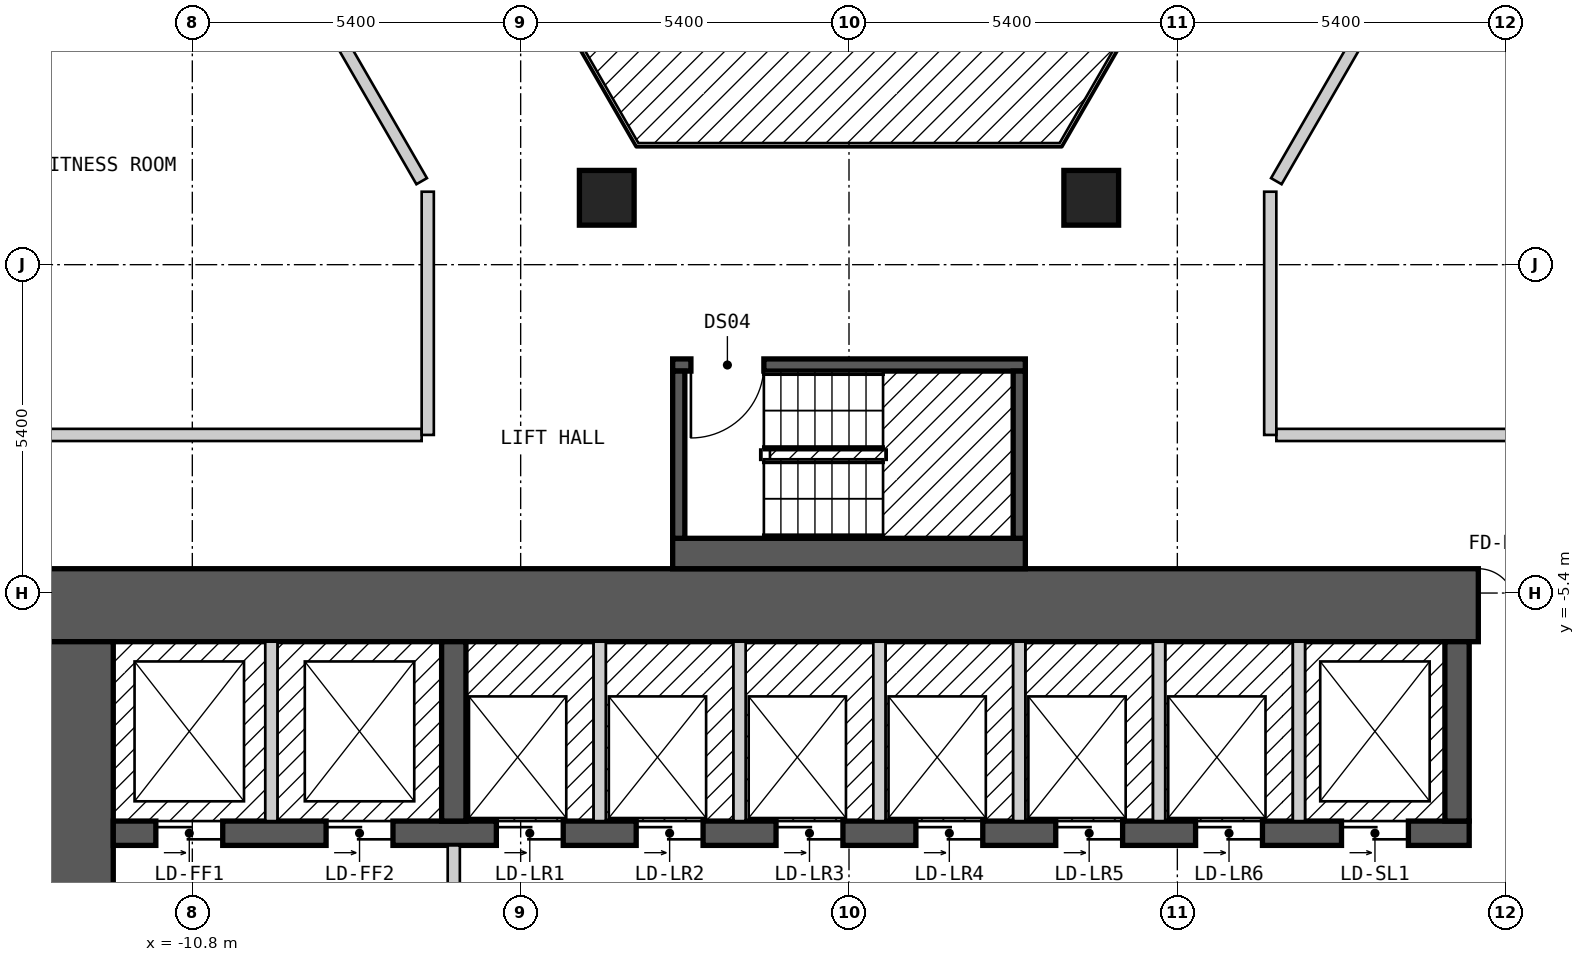
"""IFC4 building model, lengths in metres.
Left out: names, types, materials, properties, quantities, classifications, styles, units other than length and angle.
Written with IfcOpenShell. Run it as: python <this file> out.ifc"""

import sys

from ifc_helpers import new_model, si_unit, direction, frame, frame_2d, origin, origin_2d, place, context, subcontext, project, spatial, rectangle, extrude, element, fill, save


model = new_model("IFC4")
c1 = context("Model", 3, precision=1e-05, world=origin(), true_north=direction((0.0, 1.0)))
c2 = subcontext(c1, "Body", "Model", "MODEL_VIEW")
j1 = project(units=[si_unit("LENGTHUNIT", "METRE"), si_unit("PLANEANGLEUNIT", "RADIAN")], contexts=[c1])
p1 = place(None, origin())
s1 = spatial("IfcSite", under=j1, at=p1, CompositionType="ELEMENT")
p2 = place(p1, origin())
s2 = spatial("IfcBuilding", under=s1, at=p2, CompositionType="ELEMENT")
p3 = place(p2, frame((0.0, 0.0, 47.4)))
s3 = spatial("IfcBuildingStorey", under=s2, at=p3, CompositionType="ELEMENT", Elevation=47.4)
for number, where, z_axis, x_axis in (
    (1, (3.984, 1.1, 0.0), (0.0, 0.0, 1.0), (1.0, 0.0, 0.0)),
    (2, (-3.984, 1.1, 0.0), (0.0, 0.0, 1.0), (1.0, 0.0, 0.0)),
):
    element("IfcColumn", number, at=place(p3, frame(where, z_axis=z_axis, x_axis=x_axis)), inside=s3, PredefinedType="COLUMN", context=c2, shape_type="SweptSolid", body=[
        extrude(rectangle(XDim=0.9, YDim=0.9, at=origin_2d()), origin(), (0.0, 0.0, 1.0), 3.0),
    ])
p4 = place(p3, frame((-13.3, -5.6, 0.0), z_axis=(0.0, 0.0, 1.0), x_axis=(1.0, 0.0, 0.0)))
e3 = element("IfcWall", 3, at=p4, inside=s3, PredefinedType="SHEAR", context=c2, shape_type="SweptSolid", body=[
    extrude(rectangle(XDim=26.6, YDim=1.2, at=frame_2d((13.3, 0.0))), origin(), (0.0, 0.0, 1.0), 2.7),
])
p5 = place(p4, frame((23.65, 0.0, 0.0)))
e4 = element("IfcOpeningElement", 4, at=p5, cuts=e3, PredefinedType="OPENING", context=c2, shape_type="SweptSolid", body=[
    extrude(rectangle(XDim=1.2, YDim=2.1, at=frame_2d((0.6, 1.05))), frame((0.0, 0.61, 0.0), z_axis=(0.0, -1.0, 0.0), x_axis=(1.0, 0.0, 0.0)), (0.0, 0.0, 1.0), 1.22),
])
p6 = place(p3, frame((-12.7, -17.8, 0.0), z_axis=(0.0, 0.0, 1.0), x_axis=(0.0, 1.0, 0.0)))
e5 = element("IfcWall", 5, at=p6, inside=s3, PredefinedType="SHEAR", context=c2, shape_type="SweptSolid", body=[
    extrude(rectangle(XDim=11.6, YDim=1.2, at=frame_2d((5.8, 0.0))), origin(), (0.0, 0.0, 1.0), 2.7),
])
p7 = place(p6, frame((3.6, 0.0, 0.0)))
e6 = element("IfcOpeningElement", 6, at=p7, cuts=e5, PredefinedType="OPENING", context=c2, shape_type="SweptSolid", body=[
    extrude(rectangle(XDim=1.2, YDim=2.1, at=frame_2d((0.6, 1.05))), frame((0.0, 0.61, 0.0), z_axis=(0.0, -1.0, 0.0), x_axis=(1.0, 0.0, 0.0)), (0.0, 0.0, 1.0), 1.22),
])
p8 = place(p3, frame((-12.1, -9.35, 0.0), z_axis=(0.0, 0.0, 1.0), x_axis=(1.0, 0.0, 0.0)))
e7 = element("IfcWall", 7, at=p8, inside=s3, PredefinedType="SHEAR", context=c2, shape_type="SweptSolid", body=[
    extrude(rectangle(XDim=22.3, YDim=0.4, at=frame_2d((11.15, 0.0))), origin(), (0.0, 0.0, 1.0), 2.7),
])
p9 = place(p8, frame((0.7, 0.0, 0.0)))
e8 = element("IfcOpeningElement", 8, at=p9, cuts=e7, PredefinedType="OPENING", context=c2, shape_type="SweptSolid", body=[
    extrude(rectangle(XDim=1.1, YDim=2.1, at=frame_2d((0.55, 1.05))), frame((0.0, 0.21, 0.0), z_axis=(0.0, -1.0, 0.0), x_axis=(1.0, 0.0, 0.0)), (0.0, 0.0, 1.0), 0.42),
])
p10 = place(p8, frame((3.5, 0.0, 0.0)))
e9 = element("IfcOpeningElement", 9, at=p10, cuts=e7, PredefinedType="OPENING", context=c2, shape_type="SweptSolid", body=[
    extrude(rectangle(XDim=1.1, YDim=2.1, at=frame_2d((0.55, 1.05))), frame((0.0, 0.21, 0.0), z_axis=(0.0, -1.0, 0.0), x_axis=(1.0, 0.0, 0.0)), (0.0, 0.0, 1.0), 0.42),
])
p11 = place(p8, frame((6.3, 0.0, 0.0)))
e10 = element("IfcOpeningElement", 10, at=p11, cuts=e7, PredefinedType="OPENING", context=c2, shape_type="SweptSolid", body=[
    extrude(rectangle(XDim=1.1, YDim=2.1, at=frame_2d((0.55, 1.05))), frame((0.0, 0.21, 0.0), z_axis=(0.0, -1.0, 0.0), x_axis=(1.0, 0.0, 0.0)), (0.0, 0.0, 1.0), 0.42),
])
p12 = place(p8, frame((8.6, 0.0, 0.0)))
e11 = element("IfcOpeningElement", 11, at=p12, cuts=e7, PredefinedType="OPENING", context=c2, shape_type="SweptSolid", body=[
    extrude(rectangle(XDim=1.1, YDim=2.1, at=frame_2d((0.55, 1.05))), frame((0.0, 0.21, 0.0), z_axis=(0.0, -1.0, 0.0), x_axis=(1.0, 0.0, 0.0)), (0.0, 0.0, 1.0), 0.42),
])
p13 = place(p8, frame((10.9, 0.0, 0.0)))
e12 = element("IfcOpeningElement", 12, at=p13, cuts=e7, PredefinedType="OPENING", context=c2, shape_type="SweptSolid", body=[
    extrude(rectangle(XDim=1.1, YDim=2.1, at=frame_2d((0.55, 1.05))), frame((0.0, 0.21, 0.0), z_axis=(0.0, -1.0, 0.0), x_axis=(1.0, 0.0, 0.0)), (0.0, 0.0, 1.0), 0.42),
])
p14 = place(p8, frame((13.2, 0.0, 0.0)))
e13 = element("IfcOpeningElement", 13, at=p14, cuts=e7, PredefinedType="OPENING", context=c2, shape_type="SweptSolid", body=[
    extrude(rectangle(XDim=1.1, YDim=2.1, at=frame_2d((0.55, 1.05))), frame((0.0, 0.21, 0.0), z_axis=(0.0, -1.0, 0.0), x_axis=(1.0, 0.0, 0.0)), (0.0, 0.0, 1.0), 0.42),
])
p15 = place(p8, frame((15.5, 0.0, 0.0)))
e14 = element("IfcOpeningElement", 14, at=p15, cuts=e7, PredefinedType="OPENING", context=c2, shape_type="SweptSolid", body=[
    extrude(rectangle(XDim=1.1, YDim=2.1, at=frame_2d((0.55, 1.05))), frame((0.0, 0.21, 0.0), z_axis=(0.0, -1.0, 0.0), x_axis=(1.0, 0.0, 0.0)), (0.0, 0.0, 1.0), 0.42),
])
p16 = place(p8, frame((17.8, 0.0, 0.0)))
e15 = element("IfcOpeningElement", 15, at=p16, cuts=e7, PredefinedType="OPENING", context=c2, shape_type="SweptSolid", body=[
    extrude(rectangle(XDim=1.1, YDim=2.1, at=frame_2d((0.55, 1.05))), frame((0.0, 0.21, 0.0), z_axis=(0.0, -1.0, 0.0), x_axis=(1.0, 0.0, 0.0)), (0.0, 0.0, 1.0), 0.42),
])
p17 = place(p8, frame((20.2, 0.0, 0.0)))
e16 = element("IfcOpeningElement", 16, at=p17, cuts=e7, PredefinedType="OPENING", context=c2, shape_type="SweptSolid", body=[
    extrude(rectangle(XDim=1.1, YDim=2.1, at=frame_2d((0.55, 1.05))), frame((0.0, 0.21, 0.0), z_axis=(0.0, -1.0, 0.0), x_axis=(1.0, 0.0, 0.0)), (0.0, 0.0, 1.0), 0.42),
])
for number, where, z_axis, x_axis in (
    (17, (-6.5, -9.15, 0.0), (0.0, 0.0, 1.0), (0.0, 1.0, 0.0)),
    (18, (10.0, -9.15, 0.0), (0.0, 0.0, 1.0), (0.0, 1.0, 0.0)),
):
    element("IfcWall", number, at=place(p3, frame(where, z_axis=z_axis, x_axis=x_axis)), inside=s3, PredefinedType="SHEAR", context=c2, shape_type="SweptSolid", body=[
        extrude(rectangle(XDim=2.95, YDim=0.4, at=frame_2d((1.475, 0.0))), origin(), (0.0, 0.0, 1.0), 2.7),
    ])
p18 = place(p3, frame((-2.9, -4.75, 0.0), z_axis=(0.0, 0.0, 1.0), x_axis=(1.0, 0.0, 0.0)))
e19 = element("IfcWall", 19, at=p18, inside=s3, PredefinedType="SOLIDWALL", context=c2, shape_type="SweptSolid", body=[
    extrude(rectangle(XDim=5.8, YDim=0.5, at=frame_2d((2.9, 0.0))), origin(), (0.0, 0.0, 1.0), 2.7),
])
p19 = place(p3, frame((-2.9, -1.65, 0.0), z_axis=(0.0, 0.0, 1.0), x_axis=(1.0, 0.0, 0.0)))
e20 = element("IfcWall", 20, at=p19, inside=s3, PredefinedType="SOLIDWALL", context=c2, shape_type="SweptSolid", body=[
    extrude(rectangle(XDim=5.8, YDim=0.2, at=frame_2d((2.9, 0.0))), origin(), (0.0, 0.0, 1.0), 2.7),
])
p20 = place(p19, frame((0.3, 0.0, 0.0)))
e21 = element("IfcOpeningElement", 21, at=p20, cuts=e20, PredefinedType="OPENING", context=c2, shape_type="SweptSolid", body=[
    extrude(rectangle(XDim=1.2, YDim=2.1, at=frame_2d((0.6, 1.05))), frame((0.0, 0.11, 0.0), z_axis=(0.0, -1.0, 0.0), x_axis=(1.0, 0.0, 0.0)), (0.0, 0.0, 1.0), 0.22),
])
for number, where, z_axis, x_axis in (
    (22, (-2.8, -4.5, 0.0), (0.0, 0.0, 1.0), (0.0, 1.0, 0.0)),
    (23, (2.8, -4.5, 0.0), (0.0, 0.0, 1.0), (0.0, 1.0, 0.0)),
):
    element("IfcWall", number, at=place(p3, frame(where, z_axis=z_axis, x_axis=x_axis)), inside=s3, PredefinedType="SOLIDWALL", context=c2, shape_type="SweptSolid", body=[
        extrude(rectangle(XDim=2.75, YDim=0.2, at=frame_2d((1.375, 0.0))), origin(), (0.0, 0.0, 1.0), 2.7),
    ])
p21 = place(p3, frame((-10.796, 7.9, 0.0), z_axis=(0.0, 0.0, 1.0), x_axis=(0.499954271211, -0.866051803703, 0.0)))
e24 = element("IfcWall", 24, at=p21, inside=s3, PredefinedType="PARTITIONING", context=c2, shape_type="SweptSolid", body=[
    extrude(rectangle(XDim=7.536, YDim=0.2, at=frame_2d((3.768, 0.0))), origin(), (0.0, 0.0, 1.0), 2.7),
])
p22 = place(p3, frame((9.18, 15.7, 0.0), z_axis=(0.0, 0.0, 1.0), x_axis=(0.500003652032, -0.866023295272, 0.0)))
e25 = element("IfcWall", 25, at=p22, inside=s3, PredefinedType="PARTITIONING", context=c2, shape_type="SweptSolid", body=[
    extrude(rectangle(XDim=18.012, YDim=0.2, at=frame_2d((9.006, 0.0))), origin(), (0.0, 0.0, 1.0), 2.7),
])
p23 = place(p22, frame((8.556, 0.0, 0.0)))
e26 = element("IfcOpeningElement", 26, at=p23, cuts=e25, PredefinedType="OPENING", context=c2, shape_type="SweptSolid", body=[
    extrude(rectangle(XDim=0.9, YDim=2.1, at=frame_2d((0.45, 1.05))), frame((0.0, 0.11, 0.0), z_axis=(0.0, -1.0, 0.0), x_axis=(1.0, 0.0, 0.0)), (0.0, 0.0, 1.0), 0.22),
])
p24 = place(p3, frame((10.45, 17.9, 0.0), z_axis=(0.0, 0.0, 1.0), x_axis=(0.500034352617, -0.866005569383, 0.0)))
e27 = element("IfcWall", 27, at=p24, inside=s3, PredefinedType="PARTITIONING", context=c2, shape_type="SweptSolid", body=[
    extrude(rectangle(XDim=20.553, YDim=0.2, at=frame_2d((10.276, 0.0))), origin(), (0.0, 0.0, 1.0), 2.7),
])
p25 = place(p24, frame((14.879, 0.0, 0.0)))
e28 = element("IfcOpeningElement", 28, at=p25, cuts=e27, PredefinedType="OPENING", context=c2, shape_type="SweptSolid", body=[
    extrude(rectangle(XDim=1.0, YDim=2.1, at=frame_2d((0.5, 1.05))), frame((0.0, 0.11, 0.0), z_axis=(0.0, -1.0, 0.0), x_axis=(1.0, 0.0, 0.0)), (0.0, 0.0, 1.0), 0.22),
])
p26 = place(p24, frame((9.775, 0.0, 0.0)))
e29 = element("IfcOpeningElement", 29, at=p26, cuts=e27, PredefinedType="OPENING", context=c2, shape_type="SweptSolid", body=[
    extrude(rectangle(XDim=1.0, YDim=2.1, at=frame_2d((0.5, 1.05))), frame((0.0, 0.11, 0.0), z_axis=(0.0, -1.0, 0.0), x_axis=(1.0, 0.0, 0.0)), (0.0, 0.0, 1.0), 0.22),
])
p27 = place(p24, frame((4.671, 0.0, 0.0)))
e30 = element("IfcOpeningElement", 30, at=p27, cuts=e27, PredefinedType="OPENING", context=c2, shape_type="SweptSolid", body=[
    extrude(rectangle(XDim=1.0, YDim=2.1, at=frame_2d((0.5, 1.05))), frame((0.0, 0.11, 0.0), z_axis=(0.0, -1.0, 0.0), x_axis=(1.0, 0.0, 0.0)), (0.0, 0.0, 1.0), 0.22),
])
for number, where, z_axis, x_axis in (
    (31, (-15.4, -2.8, 0.0), (0.0, 0.0, 1.0), (1.0, 0.0, 0.0)),
    (32, (7.028, -2.8, 0.0), (0.0, 0.0, 1.0), (1.0, 0.0, 0.0)),
):
    element("IfcWall", number, at=place(p3, frame(where, z_axis=z_axis, x_axis=x_axis)), inside=s3, PredefinedType="PARTITIONING", context=c2, shape_type="SweptSolid", body=[
        extrude(rectangle(XDim=8.372, YDim=0.2, at=frame_2d((4.186, 0.0))), origin(), (0.0, 0.0, 1.0), 2.7),
    ])
p28 = place(p3, frame((7.028, 1.373, 0.0), z_axis=(0.0, 0.0, 1.0), x_axis=(0.49998574534, 0.86603363356, 0.0)))
e33 = element("IfcWall", 33, at=p28, inside=s3, PredefinedType="PARTITIONING", context=c2, shape_type="SweptSolid", body=[
    extrude(rectangle(XDim=7.652, YDim=0.2, at=frame_2d((3.826, 0.0))), origin(), (0.0, 0.0, 1.0), 2.7),
])
p29 = place(p3, frame((-18.244, -0.001, 0.0), z_axis=(0.0, 0.0, 1.0), x_axis=(0.499962999376, 0.866046765051, 0.0)))
e34 = element("IfcWall", 34, at=p29, inside=s3, PredefinedType="PARTITIONING", context=c2, shape_type="SweptSolid", body=[
    extrude(rectangle(XDim=18.245, YDim=0.2, at=frame_2d((9.123, 0.0))), origin(), (0.0, 0.0, 1.0), 2.7),
])
p30 = place(p29, frame((8.672, 0.0, 0.0)))
e35 = element("IfcOpeningElement", 35, at=p30, cuts=e34, PredefinedType="OPENING", context=c2, shape_type="SweptSolid", body=[
    extrude(rectangle(XDim=0.9, YDim=2.1, at=frame_2d((0.45, 1.05))), frame((0.0, 0.11, 0.0), z_axis=(0.0, -1.0, 0.0), x_axis=(1.0, 0.0, 0.0)), (0.0, 0.0, 1.0), 0.22),
])
p31 = place(p3, frame((-20.727, 0.099, 0.0), z_axis=(0.0, 0.0, 1.0), x_axis=(0.499993204491, 0.866029327138, 0.0)))
e36 = element("IfcWall", 36, at=p31, inside=s3, PredefinedType="PARTITIONING", context=c2, shape_type="SweptSolid", body=[
    extrude(rectangle(XDim=20.554, YDim=0.2, at=frame_2d((10.277, 0.0))), origin(), (0.0, 0.0, 1.0), 2.7),
])
p32 = place(p31, frame((14.88, 0.0, 0.0)))
e37 = element("IfcOpeningElement", 37, at=p32, cuts=e36, PredefinedType="OPENING", context=c2, shape_type="SweptSolid", body=[
    extrude(rectangle(XDim=1.0, YDim=2.1, at=frame_2d((0.5, 1.05))), frame((0.0, 0.11, 0.0), z_axis=(0.0, -1.0, 0.0), x_axis=(1.0, 0.0, 0.0)), (0.0, 0.0, 1.0), 0.22),
])
p33 = place(p31, frame((4.673, 0.0, 0.0)))
e38 = element("IfcOpeningElement", 38, at=p33, cuts=e36, PredefinedType="OPENING", context=c2, shape_type="SweptSolid", body=[
    extrude(rectangle(XDim=1.0, YDim=2.1, at=frame_2d((0.5, 1.05))), frame((0.0, 0.11, 0.0), z_axis=(0.0, -1.0, 0.0), x_axis=(1.0, 0.0, 0.0)), (0.0, 0.0, 1.0), 0.22),
])
p34 = place(p31, frame((0.838, 0.0, 0.0)))
e39 = element("IfcOpeningElement", 39, at=p34, cuts=e36, PredefinedType="OPENING", context=c2, shape_type="SweptSolid", body=[
    extrude(rectangle(XDim=0.8, YDim=2.1, at=frame_2d((0.4, 1.05))), frame((0.0, 0.11, 0.0), z_axis=(0.0, -1.0, 0.0), x_axis=(1.0, 0.0, 0.0)), (0.0, 0.0, 1.0), 0.22),
])
for number, where, z_axis, x_axis in (
    (40, (6.928, -2.8, 0.0), (0.0, 0.0, 1.0), (0.0, 1.0, 0.0)),
    (41, (-6.928, -2.8, 0.0), (0.0, 0.0, 1.0), (0.0, 1.0, 0.0)),
):
    element("IfcWall", number, at=place(p3, frame(where, z_axis=z_axis, x_axis=x_axis)), inside=s3, PredefinedType="PARTITIONING", context=c2, shape_type="SweptSolid", body=[
        extrude(rectangle(XDim=4.0, YDim=0.2, at=frame_2d((2.0, 0.0))), origin(), (0.0, 0.0, 1.0), 2.7),
    ])
p35 = place(p3, frame((-9.5, -9.15, 0.0), z_axis=(0.0, 0.0, 1.0), x_axis=(0.0, 1.0, 0.0)))
e42 = element("IfcWall", 42, at=p35, inside=s3, PredefinedType="SOLIDWALL", context=c2, shape_type="SweptSolid", body=[
    extrude(rectangle(XDim=2.95, YDim=0.2, at=frame_2d((1.475, 0.0))), origin(), (0.0, 0.0, 1.0), 2.7),
])
p36 = place(p3, frame((-6.5, -14.45, 0.0), z_axis=(0.0, 0.0, 1.0), x_axis=(0.0, 1.0, 0.0)))
e43 = element("IfcWall", 43, at=p36, inside=s3, PredefinedType="PARTITIONING", context=c2, shape_type="SweptSolid", body=[
    extrude(rectangle(XDim=4.9, YDim=0.2, at=frame_2d((2.45, 0.0))), origin(), (0.0, 0.0, 1.0), 2.7),
])
p37 = place(p36, frame((3.15, 0.0, 0.0), z_axis=(0.0, 0.0, 1.0), x_axis=(-1.0, 0.0, 0.0)))
e44 = element("IfcOpeningElement", 44, at=p37, cuts=e43, PredefinedType="OPENING", context=c2, shape_type="SweptSolid", body=[
    extrude(rectangle(XDim=1.4, YDim=2.1, at=frame_2d((0.7, 1.05))), frame((0.0, 0.11, 0.0), z_axis=(0.0, -1.0, 0.0), x_axis=(1.0, 0.0, 0.0)), (0.0, 0.0, 1.0), 0.22),
])
for number, where, z_axis, x_axis in (
    (45, (-4.1, -9.15, 0.0), (0.0, 0.0, 1.0), (0.0, 1.0, 0.0)),
    (46, (-1.8, -9.15, 0.0), (0.0, 0.0, 1.0), (0.0, 1.0, 0.0)),
    (47, (0.5, -9.15, 0.0), (0.0, 0.0, 1.0), (0.0, 1.0, 0.0)),
    (48, (2.8, -9.15, 0.0), (0.0, 0.0, 1.0), (0.0, 1.0, 0.0)),
    (49, (5.1, -9.15, 0.0), (0.0, 0.0, 1.0), (0.0, 1.0, 0.0)),
    (50, (7.4, -9.15, 0.0), (0.0, 0.0, 1.0), (0.0, 1.0, 0.0)),
):
    element("IfcWall", number, at=place(p3, frame(where, z_axis=z_axis, x_axis=x_axis)), inside=s3, PredefinedType="SOLIDWALL", context=c2, shape_type="SweptSolid", body=[
        extrude(rectangle(XDim=2.95, YDim=0.2, at=frame_2d((1.475, 0.0))), origin(), (0.0, 0.0, 1.0), 2.7),
    ])
p38 = place(p20, origin())
e51 = element("IfcDoor", 51, at=p38, inside=s3, OperationType="SINGLE_SWING_LEFT", PredefinedType="DOOR", context=c2, shape_type="SweptSolid", body=[
    extrude(rectangle(XDim=1.2, YDim=2.1, at=frame_2d((0.6, 1.05))), frame((0.0, 0.025, 0.0), z_axis=(0.0, -1.0, 0.0), x_axis=(1.0, 0.0, 0.0)), (0.0, 0.0, 1.0), 0.05),
])
fill(e21, e51)
p39 = place(p9, origin())
e52 = element("IfcDoor", 52, at=p39, inside=s3, OperationType="DOUBLE_DOOR_SLIDING", PredefinedType="DOOR", context=c2, shape_type="SweptSolid", body=[
    extrude(rectangle(XDim=1.1, YDim=2.1, at=frame_2d((0.55, 1.05))), frame((0.0, 0.025, 0.0), z_axis=(0.0, -1.0, 0.0), x_axis=(1.0, 0.0, 0.0)), (0.0, 0.0, 1.0), 0.05),
])
fill(e8, e52)
p40 = place(p10, origin())
e53 = element("IfcDoor", 53, at=p40, inside=s3, OperationType="DOUBLE_DOOR_SLIDING", PredefinedType="DOOR", context=c2, shape_type="SweptSolid", body=[
    extrude(rectangle(XDim=1.1, YDim=2.1, at=frame_2d((0.55, 1.05))), frame((0.0, 0.025, 0.0), z_axis=(0.0, -1.0, 0.0), x_axis=(1.0, 0.0, 0.0)), (0.0, 0.0, 1.0), 0.05),
])
fill(e9, e53)
p41 = place(p11, origin())
e54 = element("IfcDoor", 54, at=p41, inside=s3, OperationType="DOUBLE_DOOR_SLIDING", PredefinedType="DOOR", context=c2, shape_type="SweptSolid", body=[
    extrude(rectangle(XDim=1.1, YDim=2.1, at=frame_2d((0.55, 1.05))), frame((0.0, 0.025, 0.0), z_axis=(0.0, -1.0, 0.0), x_axis=(1.0, 0.0, 0.0)), (0.0, 0.0, 1.0), 0.05),
])
fill(e10, e54)
p42 = place(p12, origin())
e55 = element("IfcDoor", 55, at=p42, inside=s3, OperationType="DOUBLE_DOOR_SLIDING", PredefinedType="DOOR", context=c2, shape_type="SweptSolid", body=[
    extrude(rectangle(XDim=1.1, YDim=2.1, at=frame_2d((0.55, 1.05))), frame((0.0, 0.025, 0.0), z_axis=(0.0, -1.0, 0.0), x_axis=(1.0, 0.0, 0.0)), (0.0, 0.0, 1.0), 0.05),
])
fill(e11, e55)
p43 = place(p13, origin())
e56 = element("IfcDoor", 56, at=p43, inside=s3, OperationType="DOUBLE_DOOR_SLIDING", PredefinedType="DOOR", context=c2, shape_type="SweptSolid", body=[
    extrude(rectangle(XDim=1.1, YDim=2.1, at=frame_2d((0.55, 1.05))), frame((0.0, 0.025, 0.0), z_axis=(0.0, -1.0, 0.0), x_axis=(1.0, 0.0, 0.0)), (0.0, 0.0, 1.0), 0.05),
])
fill(e12, e56)
p44 = place(p14, origin())
e57 = element("IfcDoor", 57, at=p44, inside=s3, OperationType="DOUBLE_DOOR_SLIDING", PredefinedType="DOOR", context=c2, shape_type="SweptSolid", body=[
    extrude(rectangle(XDim=1.1, YDim=2.1, at=frame_2d((0.55, 1.05))), frame((0.0, 0.025, 0.0), z_axis=(0.0, -1.0, 0.0), x_axis=(1.0, 0.0, 0.0)), (0.0, 0.0, 1.0), 0.05),
])
fill(e13, e57)
p45 = place(p15, origin())
e58 = element("IfcDoor", 58, at=p45, inside=s3, OperationType="DOUBLE_DOOR_SLIDING", PredefinedType="DOOR", context=c2, shape_type="SweptSolid", body=[
    extrude(rectangle(XDim=1.1, YDim=2.1, at=frame_2d((0.55, 1.05))), frame((0.0, 0.025, 0.0), z_axis=(0.0, -1.0, 0.0), x_axis=(1.0, 0.0, 0.0)), (0.0, 0.0, 1.0), 0.05),
])
fill(e14, e58)
p46 = place(p16, origin())
e59 = element("IfcDoor", 59, at=p46, inside=s3, OperationType="DOUBLE_DOOR_SLIDING", PredefinedType="DOOR", context=c2, shape_type="SweptSolid", body=[
    extrude(rectangle(XDim=1.1, YDim=2.1, at=frame_2d((0.55, 1.05))), frame((0.0, 0.025, 0.0), z_axis=(0.0, -1.0, 0.0), x_axis=(1.0, 0.0, 0.0)), (0.0, 0.0, 1.0), 0.05),
])
fill(e15, e59)
p47 = place(p17, origin())
e60 = element("IfcDoor", 60, at=p47, inside=s3, OperationType="DOUBLE_DOOR_SLIDING", PredefinedType="DOOR", context=c2, shape_type="SweptSolid", body=[
    extrude(rectangle(XDim=1.1, YDim=2.1, at=frame_2d((0.55, 1.05))), frame((0.0, 0.025, 0.0), z_axis=(0.0, -1.0, 0.0), x_axis=(1.0, 0.0, 0.0)), (0.0, 0.0, 1.0), 0.05),
])
fill(e16, e60)
p48 = place(p5, origin())
e61 = element("IfcDoor", 61, at=p48, inside=s3, OperationType="DOUBLE_DOOR_SINGLE_SWING", PredefinedType="DOOR", context=c2, shape_type="SweptSolid", body=[
    extrude(rectangle(XDim=1.2, YDim=2.1, at=frame_2d((0.6, 1.05))), frame((0.0, 0.025, 0.0), z_axis=(0.0, -1.0, 0.0), x_axis=(1.0, 0.0, 0.0)), (0.0, 0.0, 1.0), 0.05),
])
fill(e4, e61)
save(model, sys.argv[1])
